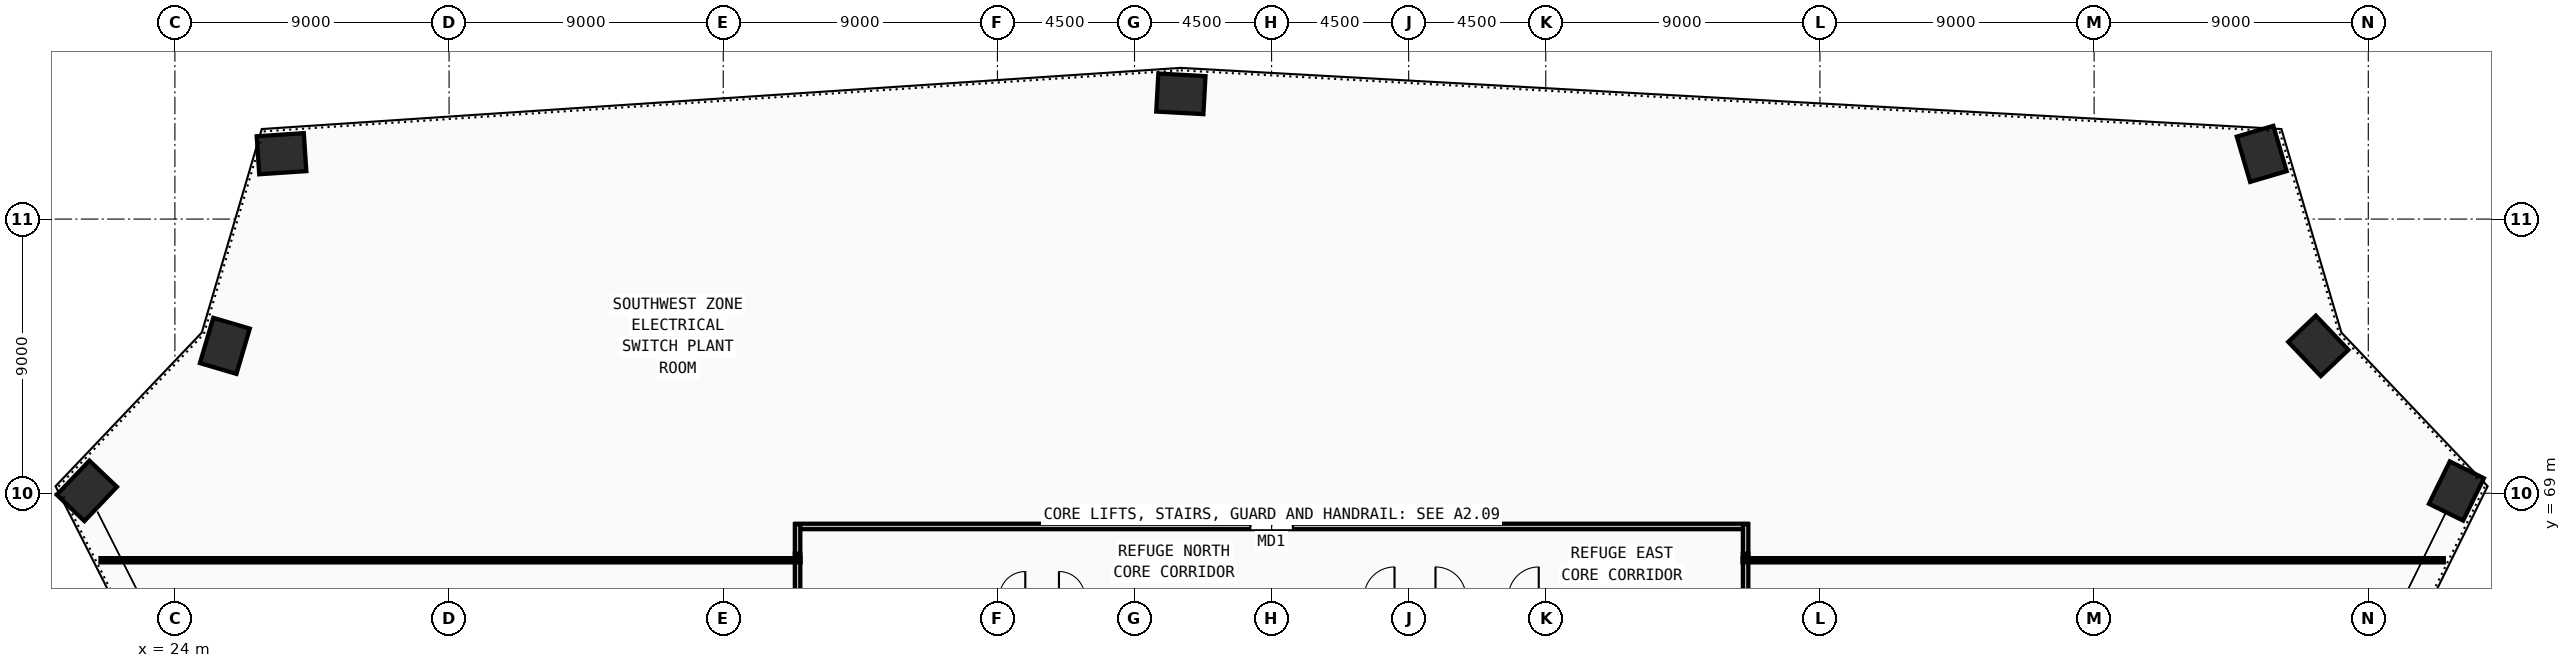
"""IFC4 building model, lengths in metres.
Left out: names, types, materials, properties, quantities, classifications, styles, units other than length and angle.
Written with IfcOpenShell. Run it as: python <this file> out.ifc"""

import sys

from ifc_helpers import new_model, si_unit, direction, frame, frame_2d, origin, origin_2d, place, context, subcontext, project, spatial, rectangle, extrude, source, transform, mapped, element, fill, save


model = new_model("IFC4")
c1 = context("Model", 3, precision=1e-05, world=origin(), true_north=direction((0.0, 1.0)))
c2 = subcontext(c1, "Body", "Model", "MODEL_VIEW")
j1 = project(units=[si_unit("LENGTHUNIT", "METRE"), si_unit("PLANEANGLEUNIT", "RADIAN")], contexts=[c1])
p1 = place(None, origin())
s1 = spatial("IfcSite", under=j1, at=p1, CompositionType="ELEMENT")
p2 = place(p1, origin())
s2 = spatial("IfcBuilding", under=s1, at=p2, CompositionType="ELEMENT")
p3 = place(p2, frame((0.0, 0.0, 47.25)))
s3 = spatial("IfcBuildingStorey", under=s2, at=p3, CompositionType="ELEMENT", Elevation=47.25)
m1 = source(origin(), c2, "Body", "SweptSolid", [
    extrude(rectangle(XDim=1.55, YDim=1.25, at=origin_2d()), origin(), (0.0, 0.0, 1.0), 4.5),
])
for number, where, z_axis, x_axis in (
    (1, (21.111, 69.078, 0.0), (0.0, 0.0, 1.0), (0.689, 0.724, 0.0)),
    (2, (25.64, 73.838, 0.0), (0.0, 0.0, 1.0), (0.283, 0.959, 0.0)),
    (3, (27.5, 80.146, 0.0), (0.0, 0.0, 1.0), (0.998, 0.066, 0.0)),
    (4, (57.022, 82.111, 0.0), (0.0, 0.0, 1.0), (-0.998, 0.055, 0.0)),
    (5, (92.502, 80.14, 0.0), (0.0, 0.0, 1.0), (-0.283, 0.959, 0.0)),
    (6, (94.36, 73.838, 0.0), (0.0, 0.0, 1.0), (-0.689, 0.724, 0.0)),
    (7, (98.894, 69.073, 0.0), (0.0, 0.0, 1.0), (0.441, 0.897, 0.0)),
):
    element("IfcColumn", number, at=place(p3, frame(where, z_axis=z_axis, x_axis=x_axis)), inside=s3, PredefinedType="COLUMN", context=c2, shape_type="MappedRepresentation", body=[
        mapped(m1, transform((0.0, 0.0, 0.0), x_axis=(1.0, 0.0, 0.0), y_axis=(0.0, 1.0, 0.0), z_axis=(0.0, 0.0, 1.0), scale=1.0)),
    ])
p4 = place(p3, frame((75.56, 67.015, 0.0), z_axis=(0.0, 0.0, 1.0), x_axis=(0.0, -1.0, 0.0)))
e8 = element("IfcWall", 8, at=p4, inside=s3, PredefinedType="PARTITIONING", context=c2, shape_type="SweptSolid", body=[
    extrude(rectangle(XDim=22.43, YDim=0.18, at=frame_2d((11.215, 0.0))), origin(), (0.0, 0.0, 1.0), 4.32),
])
m2 = source(origin(), c2, "Body", "SweptSolid", [
    extrude(rectangle(XDim=1.3, YDim=2.2, at=frame_2d((0.65, 1.1))), frame((0.0, 0.1, 0.0), z_axis=(0.0, -1.0, 0.0), x_axis=(1.0, 0.0, 0.0)), (0.0, 0.0, 1.0), 0.2),
])
p5 = place(p4, frame((10.565, 0.0, 0.0)))
e9 = element("IfcOpeningElement", 9, at=p5, cuts=e8, PredefinedType="OPENING", context=c2, shape_type="MappedRepresentation", body=[
    mapped(m2, transform((0.0, 0.0, 0.0), x_axis=(1.0, 0.0, 0.0), y_axis=(0.0, 1.0, 0.0), z_axis=(0.0, 0.0, 1.0), scale=1.0)),
])
p6 = place(p3, frame((44.37, 67.91, 0.0), z_axis=(0.0, 0.0, 1.0), x_axis=(1.0, 0.0, 0.0)))
e10 = element("IfcWall", 10, at=p6, inside=s3, PredefinedType="PARTITIONING", context=c2, shape_type="SweptSolid", body=[
    extrude(rectangle(XDim=31.26, YDim=0.18, at=frame_2d((15.63, 0.0))), origin(), (0.0, 0.0, 1.0), 4.32),
])
m3 = source(origin(), c2, "Body", "SweptSolid", [
    extrude(rectangle(XDim=1.4, YDim=2.25, at=frame_2d((0.7, 1.125))), frame((0.0, 0.1, 0.0), z_axis=(0.0, -1.0, 0.0), x_axis=(1.0, 0.0, 0.0)), (0.0, 0.0, 1.0), 0.2),
])
p7 = place(p6, frame((14.93, 0.0, 0.0)))
e11 = element("IfcOpeningElement", 11, at=p7, cuts=e10, PredefinedType="OPENING", context=c2, shape_type="MappedRepresentation", body=[
    mapped(m3, transform((0.0, 0.0, 0.0), x_axis=(1.0, 0.0, 0.0), y_axis=(0.0, 1.0, 0.0), z_axis=(0.0, 0.0, 1.0), scale=1.0)),
])
p8 = place(p3, frame((44.44, 55.98, 0.0), z_axis=(0.0, 0.0, 1.0), x_axis=(0.0, 1.0, 0.0)))
e12 = element("IfcWall", 12, at=p8, inside=s3, PredefinedType="PARTITIONING", context=c2, shape_type="SweptSolid", body=[
    extrude(rectangle(XDim=11.035, YDim=0.18, at=frame_2d((5.518, 0.0))), origin(), (0.0, 0.0, 1.0), 4.32),
])
p9 = place(p8, frame((4.818, 0.0, 0.0)))
e13 = element("IfcOpeningElement", 13, at=p9, cuts=e12, PredefinedType="OPENING", context=c2, shape_type="MappedRepresentation", body=[
    mapped(m3, transform((0.0, 0.0, 0.0), x_axis=(1.0, 0.0, 0.0), y_axis=(0.0, 1.0, 0.0), z_axis=(0.0, 0.0, 1.0), scale=1.0)),
])
for number, where, z_axis, x_axis in (
    (14, (44.44, 67.015, 0.0), (0.0, 0.0, 1.0), (0.0, 1.0, 0.0)),
    (15, (75.56, 67.98, 0.0), (0.0, 0.0, 1.0), (0.0, -1.0, 0.0)),
):
    element("IfcWall", number, at=place(p3, frame(where, z_axis=z_axis, x_axis=x_axis)), inside=s3, PredefinedType="PARTITIONING", context=c2, shape_type="SweptSolid", body=[
        extrude(rectangle(XDim=0.965, YDim=0.18, at=frame_2d((0.482, 0.0))), origin(), (0.0, 0.0, 1.0), 4.32),
    ])
p10 = place(p3, frame((44.54, 66.8, 0.0), z_axis=(0.0, 0.0, 1.0), x_axis=(-1.0, 0.0, 0.0)))
e16 = element("IfcWall", 16, at=p10, inside=s3, PredefinedType="PARTITIONING", context=c2, shape_type="SweptSolid", body=[
    extrude(rectangle(XDim=22.983, YDim=0.14, at=frame_2d((11.492, 0.0))), origin(), (0.0, 0.0, 1.0), 3.405),
])
p11 = place(p3, frame((75.46, 66.8, 0.0), z_axis=(0.0, 0.0, 1.0), x_axis=(1.0, 0.0, 0.0)))
e17 = element("IfcWall", 17, at=p11, inside=s3, PredefinedType="PARTITIONING", context=c2, shape_type="SweptSolid", body=[
    extrude(rectangle(XDim=23.018, YDim=0.14, at=frame_2d((11.509, 0.0))), origin(), (0.0, 0.0, 1.0), 3.405),
])
m4 = source(origin(), c2, "Body", "SweptSolid", [
    extrude(rectangle(XDim=1.4, YDim=2.25, at=frame_2d((0.7, 1.125))), frame((0.0, 0.025, 0.0), z_axis=(0.0, -1.0, 0.0), x_axis=(1.0, 0.0, 0.0)), (0.0, 0.0, 1.0), 0.05),
])
p12 = place(p7, origin())
e18 = element("IfcDoor", 18, at=p12, inside=s3, OperationType="DOUBLE_DOOR_SINGLE_SWING", PredefinedType="DOOR", context=c2, shape_type="MappedRepresentation", body=[
    mapped(m4, transform((0.0, 0.0, 0.0), x_axis=(1.0, 0.0, 0.0), y_axis=(0.0, 1.0, 0.0), z_axis=(0.0, 0.0, 1.0), scale=1.0)),
])
fill(e11, e18)
save(model, sys.argv[1])
